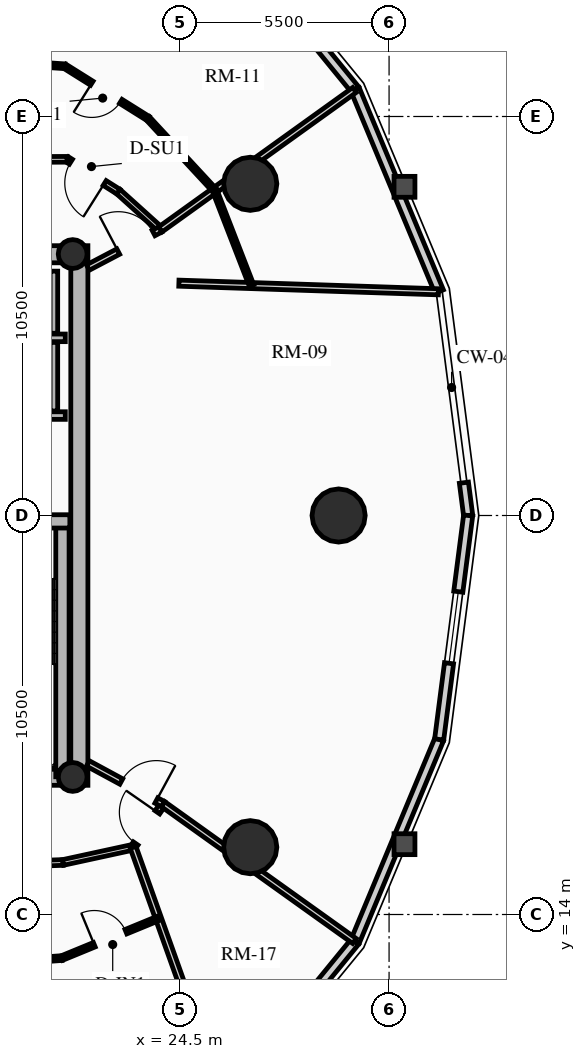
"""IFC4 building model, lengths in metres.
Left out: names, types, materials, properties, quantities, classifications, styles, units other than length and angle.
Written with IfcOpenShell. Run it as: python <this file> out.ifc"""

import sys

from ifc_helpers import new_model, si_unit, direction, frame, frame_2d, origin, origin_2d, place, context, subcontext, project, spatial, rectangle, circle, hollow_circle, extrude, source, transform, mapped, element, fill, save


model = new_model("IFC4")
c1 = context("Model", 3, precision=1e-05, world=origin(), true_north=direction((0.0, 1.0)))
c2 = subcontext(c1, "Body", "Model", "MODEL_VIEW")
j1 = project(units=[si_unit("LENGTHUNIT", "METRE"), si_unit("PLANEANGLEUNIT", "RADIAN")], contexts=[c1])
p1 = place(None, origin())
s1 = spatial("IfcSite", under=j1, at=p1, CompositionType="ELEMENT")
p2 = place(p1, origin())
s2 = spatial("IfcBuilding", under=s1, at=p2, CompositionType="ELEMENT")
p3 = place(p2, frame((0.0, 0.0, 105.07)))
s3 = spatial("IfcBuildingStorey", under=s2, at=p3, CompositionType="ELEMENT", Elevation=105.07)
p4 = place(p3, frame((21.85, 17.4, 0.0), z_axis=(0.0, 0.0, 1.0), x_axis=(0.0, 1.0, 0.0)))
e1 = element("IfcWall", 1, at=p4, inside=s3, PredefinedType="SHEAR", context=c2, shape_type="SweptSolid", body=[
    extrude(rectangle(XDim=14.2, YDim=0.45, at=frame_2d((7.1, 0.0))), origin(), (0.0, 0.0, 1.0), 2.91),
])
p5 = place(p3, frame((11.15, 17.625, 0.0), z_axis=(0.0, 0.0, 1.0), x_axis=(1.0, 0.0, 0.0)))
e2 = element("IfcWall", 2, at=p5, inside=s3, PredefinedType="SHEAR", context=c2, shape_type="SweptSolid", body=[
    extrude(rectangle(XDim=10.7, YDim=0.45, at=frame_2d((5.35, 0.0))), origin(), (0.0, 0.0, 1.0), 2.91),
])
m1 = source(origin(), c2, "Body", "SweptSolid", [
    extrude(rectangle(XDim=1.5, YDim=2.02, at=frame_2d((0.75, 1.01))), frame((0.0, 0.235, 0.0), z_axis=(0.0, -1.0, 0.0), x_axis=(1.0, 0.0, 0.0)), (0.0, 0.0, 1.0), 0.47),
])
p6 = place(p5, frame((5.45, 0.0, 0.0)))
e3 = element("IfcOpeningElement", 3, at=p6, cuts=e2, PredefinedType="OPENING", context=c2, shape_type="MappedRepresentation", body=[
    mapped(m1, transform((0.0, 0.0, 0.0), x_axis=(1.0, 0.0, 0.0), y_axis=(0.0, 1.0, 0.0), z_axis=(0.0, 0.0, 1.0), scale=1.0)),
])
p7 = place(p3, frame((11.15, 31.375, 0.0), z_axis=(0.0, 0.0, 1.0), x_axis=(1.0, 0.0, 0.0)))
e4 = element("IfcWall", 4, at=p7, inside=s3, PredefinedType="SHEAR", context=c2, shape_type="SweptSolid", body=[
    extrude(rectangle(XDim=10.7, YDim=0.45, at=frame_2d((5.35, 0.0))), origin(), (0.0, 0.0, 1.0), 2.91),
])
p8 = place(p7, frame((4.6, 0.0, 0.0)))
e5 = element("IfcOpeningElement", 5, at=p8, cuts=e4, PredefinedType="OPENING", context=c2, shape_type="MappedRepresentation", body=[
    mapped(m1, transform((0.0, 0.0, 0.0), x_axis=(1.0, 0.0, 0.0), y_axis=(0.0, 1.0, 0.0), z_axis=(0.0, 0.0, 1.0), scale=1.0)),
])
p9 = place(p3, frame((21.405, 17.625, 0.0), z_axis=(0.0, 0.0, 1.0), x_axis=(0.0, 1.0, 0.0)))
e6 = element("IfcWall", 6, at=p9, inside=s3, PredefinedType="SHEAR", context=c2, shape_type="SweptSolid", body=[
    extrude(rectangle(XDim=6.72, YDim=0.35, at=frame_2d((3.36, 0.0))), origin(), (0.0, 0.0, 1.0), 2.91),
])
p10 = place(p3, frame((18.315, 24.345, 0.0), z_axis=(0.0, 0.0, 1.0), x_axis=(1.0, 0.0, 0.0)))
e7 = element("IfcWall", 7, at=p10, inside=s3, PredefinedType="SHEAR", context=c2, shape_type="SweptSolid", body=[
    extrude(rectangle(XDim=3.285, YDim=0.35, at=frame_2d((1.643, 0.0))), origin(), (0.0, 0.0, 1.0), 2.91),
])
for number, where, z_axis, x_axis in (
    (8, (21.675, 17.62, 0.0), (0.0, 0.0, 1.0), (1.0, 0.0, 0.0)),
    (9, (21.675, 31.38, 0.0), (0.0, 0.0, 1.0), (1.0, 0.0, 0.0)),
):
    element("IfcColumn", number, at=place(p3, frame(where, z_axis=z_axis, x_axis=x_axis)), inside=s3, PredefinedType="COLUMN", context=c2, shape_type="SweptSolid", body=[
        extrude(hollow_circle(Radius=0.38, WallThickness=0.032, at=origin_2d()), origin(), (0.0, 0.0, 1.0), 2.91),
    ])
for number, where, z_axis, x_axis in (
    (10, (28.672, 24.5, 0.0), (0.0, 0.0, 1.0), (1.0, 0.0, 0.0)),
    (11, (26.347, 33.229, 0.0), (0.0, 0.0, 1.0), (1.0, 0.0, 0.0)),
    (12, (26.347, 15.771, 0.0), (0.0, 0.0, 1.0), (1.0, 0.0, 0.0)),
):
    element("IfcColumn", number, at=place(p3, frame(where, z_axis=z_axis, x_axis=x_axis)), inside=s3, PredefinedType="USERDEFINED", context=c2, shape_type="SweptSolid", body=[
        extrude(circle(Radius=0.7, at=origin_2d()), origin(), (0.0, 0.0, 1.0), 2.91),
    ])
p11 = place(p3, frame((31.969, 25.363, 0.0), z_axis=(0.0, 0.0, 1.0), x_axis=(0.128523364007, -0.991706481225, 0.0)))
e13 = element("IfcWall", 13, at=p11, inside=s3, PredefinedType="SOLIDWALL", context=c2, shape_type="SweptSolid", body=[
    extrude(rectangle(XDim=0.87, YDim=0.24, at=frame_2d((0.435, 0.0))), origin(), (0.0, 0.0, 1.0), 2.655),
])
p12 = place(p3, frame((29.105, 35.709, 0.0), z_axis=(0.0, 0.0, 1.0), x_axis=(0.384344417632, -0.923189779317, 0.0)))
e14 = element("IfcWall", 14, at=p12, inside=s3, PredefinedType="SOLIDWALL", context=c2, shape_type="SweptSolid", body=[
    extrude(rectangle(XDim=5.758, YDim=0.24, at=frame_2d((2.879, 0.0))), origin(), (0.0, 0.0, 1.0), 2.179),
])
p13 = place(p3, frame((25.658, 39.928, 0.0), z_axis=(0.0, 0.0, 1.0), x_axis=(0.632700781152, -0.77439635945, 0.0)))
e15 = element("IfcWall", 15, at=p13, inside=s3, PredefinedType="SOLIDWALL", context=c2, shape_type="SweptSolid", body=[
    extrude(rectangle(XDim=5.448, YDim=0.24, at=frame_2d((2.724, 0.0))), origin(), (0.0, 0.0, 1.0), 2.179),
])
m2 = source(origin(), c2, "Body", "SweptSolid", [
    extrude(rectangle(XDim=1.9, YDim=1.35, at=frame_2d((0.95, 0.675))), frame((0.0, 0.13, 0.0), z_axis=(0.0, -1.0, 0.0), x_axis=(1.0, 0.0, 0.0)), (0.0, 0.0, 1.0), 0.26),
])
p14 = place(p13, frame((1.774, 0.0, 0.65)))
e16 = element("IfcOpeningElement", 16, at=p14, cuts=e15, PredefinedType="OPENING", context=c2, shape_type="MappedRepresentation", body=[
    mapped(m2, transform((0.0, 0.0, 0.0), x_axis=(1.0, 0.0, 0.0), y_axis=(0.0, 1.0, 0.0), z_axis=(0.0, 0.0, 1.0), scale=1.0)),
])
p15 = place(p3, frame((29.105, 13.291, 0.0), z_axis=(0.0, 0.0, 1.0), x_axis=(-0.632700781152, -0.77439635945, 0.0)))
e17 = element("IfcWall", 17, at=p15, inside=s3, PredefinedType="SOLIDWALL", context=c2, shape_type="SweptSolid", body=[
    extrude(rectangle(XDim=5.448, YDim=0.24, at=frame_2d((2.724, 0.0))), origin(), (0.0, 0.0, 1.0), 2.179),
])
p16 = place(p15, frame((1.774, 0.0, 0.65)))
e18 = element("IfcOpeningElement", 18, at=p16, cuts=e17, PredefinedType="OPENING", context=c2, shape_type="MappedRepresentation", body=[
    mapped(m2, transform((0.0, 0.0, 0.0), x_axis=(1.0, 0.0, 0.0), y_axis=(0.0, 1.0, 0.0), z_axis=(0.0, 0.0, 1.0), scale=1.0)),
])
p17 = place(p3, frame((31.318, 18.607, 0.0), z_axis=(0.0, 0.0, 1.0), x_axis=(-0.384344417632, -0.923189779317, 0.0)))
e19 = element("IfcWall", 19, at=p17, inside=s3, PredefinedType="SOLIDWALL", context=c2, shape_type="SweptSolid", body=[
    extrude(rectangle(XDim=5.758, YDim=0.24, at=frame_2d((2.879, 0.0))), origin(), (0.0, 0.0, 1.0), 2.179),
])
p18 = place(p3, frame((32.081, 24.5, 0.0), z_axis=(0.0, 0.0, 1.0), x_axis=(-0.128351991996, -0.991728675672, 0.0)))
e20 = element("IfcWall", 20, at=p18, inside=s3, PredefinedType="SOLIDWALL", context=c2, shape_type="SweptSolid", body=[
    extrude(rectangle(XDim=5.942, YDim=0.24, at=frame_2d((2.971, 0.0))), origin(), (0.0, 0.0, 1.0), 2.179),
])
p19 = place(p18, frame((2.021, 0.0, 0.65)))
e21 = element("IfcOpeningElement", 21, at=p19, cuts=e20, PredefinedType="OPENING", context=c2, shape_type="MappedRepresentation", body=[
    mapped(m2, transform((0.0, 0.0, 0.0), x_axis=(1.0, 0.0, 0.0), y_axis=(0.0, 1.0, 0.0), z_axis=(0.0, 0.0, 1.0), scale=1.0)),
])
for number, where, z_axis, x_axis in (
    (22, (18.51, 27.13, 0.0), (0.0, 0.0, 1.0), (1.0, 0.0, 0.0)),
    (23, (18.51, 29.175, 0.0), (0.0, 0.0, 1.0), (1.0, 0.0, 0.0)),
):
    element("IfcWall", number, at=place(p3, frame(where, z_axis=z_axis, x_axis=x_axis)), inside=s3, PredefinedType="SHEAR", context=c2, shape_type="SweptSolid", body=[
        extrude(rectangle(XDim=2.97, YDim=0.2, at=frame_2d((1.485, 0.0))), origin(), (0.0, 0.0, 1.0), 2.91),
    ])
p20 = place(p3, frame((21.18, 27.25, 0.0), z_axis=(0.0, 0.0, 1.0), x_axis=(0.0, 1.0, 0.0)))
e24 = element("IfcWall", 24, at=p20, inside=s3, PredefinedType="SHEAR", context=c2, shape_type="SweptSolid", body=[
    extrude(rectangle(XDim=1.805, YDim=0.2, at=frame_2d((0.902, 0.0))), origin(), (0.0, 0.0, 1.0), 2.91),
])
p21 = place(p3, frame((21.18, 29.295, 0.0), z_axis=(0.0, 0.0, 1.0), x_axis=(0.0, 1.0, 0.0)))
e25 = element("IfcWall", 25, at=p21, inside=s3, PredefinedType="SHEAR", context=c2, shape_type="SweptSolid", body=[
    extrude(rectangle(XDim=1.635, YDim=0.2, at=frame_2d((0.817, 0.0))), origin(), (0.0, 0.0, 1.0), 2.91),
])
p22 = place(p3, frame((23.98, 32.027, 0.0), z_axis=(0.0, 0.0, 1.0), x_axis=(-0.742353224332, 0.670008724065, 0.0)))
e26 = element("IfcWall", 26, at=p22, inside=s3, PredefinedType="PARTITIONING", context=c2, shape_type="SweptSolid", body=[
    extrude(rectangle(XDim=1.485, YDim=0.15, at=frame_2d((0.742, 0.0))), origin(), (0.0, 0.0, 1.0), 2.225),
])
p23 = place(p3, frame((22.877, 33.022, 0.0), z_axis=(0.0, 0.0, 1.0), x_axis=(-0.845895608855, 0.533348496689, 0.0)))
e27 = element("IfcWall", 27, at=p23, inside=s3, PredefinedType="PARTITIONING", context=c2, shape_type="SweptSolid", body=[
    extrude(rectangle(XDim=1.597, YDim=0.15, at=frame_2d((0.798, 0.0))), origin(), (0.0, 0.0, 1.0), 2.225),
])
m3 = source(origin(), c2, "Body", "SweptSolid", [
    extrude(rectangle(XDim=1.05, YDim=2.015, at=frame_2d((0.525, 1.007))), frame((0.0, 0.085, 0.0), z_axis=(0.0, -1.0, 0.0), x_axis=(1.0, 0.0, 0.0)), (0.0, 0.0, 1.0), 0.17),
])
p24 = place(p23, frame((0.427, 0.0, 0.0)))
e28 = element("IfcOpeningElement", 28, at=p24, cuts=e27, PredefinedType="OPENING", context=c2, shape_type="MappedRepresentation", body=[
    mapped(m3, transform((0.0, 0.0, 0.0), x_axis=(1.0, 0.0, 0.0), y_axis=(0.0, 1.0, 0.0), z_axis=(0.0, 0.0, 1.0), scale=1.0)),
])
p25 = place(p3, frame((21.527, 33.873, 0.0), z_axis=(0.0, 0.0, 1.0), x_axis=(-0.999991838845, -0.004040079574, 0.0)))
e29 = element("IfcWall", 29, at=p25, inside=s3, PredefinedType="PARTITIONING", context=c2, shape_type="SweptSolid", body=[
    extrude(rectangle(XDim=3.384, YDim=0.15, at=frame_2d((1.692, 0.0))), origin(), (0.0, 0.0, 1.0), 2.225),
])
p26 = place(p3, frame((14.781, 15.141, 0.0), z_axis=(0.0, 0.0, 1.0), x_axis=(0.999407918707, 0.034406569513, 0.0)))
e30 = element("IfcWall", 30, at=p26, inside=s3, PredefinedType="PARTITIONING", context=c2, shape_type="SweptSolid", body=[
    extrude(rectangle(XDim=6.642, YDim=0.15, at=frame_2d((3.321, 0.0))), origin(), (0.0, 0.0, 1.0), 2.225),
])
p27 = place(p26, frame((2.796, 0.0, 0.0)))
e31 = element("IfcOpeningElement", 31, at=p27, cuts=e30, PredefinedType="OPENING", context=c2, shape_type="MappedRepresentation", body=[
    mapped(m3, transform((0.0, 0.0, 0.0), x_axis=(1.0, 0.0, 0.0), y_axis=(0.0, 1.0, 0.0), z_axis=(0.0, 0.0, 1.0), scale=1.0)),
])
p28 = place(p3, frame((21.419, 15.369, 0.0), z_axis=(0.0, 0.0, 1.0), x_axis=(0.977192701953, 0.212354475464, 0.0)))
e32 = element("IfcWall", 32, at=p28, inside=s3, PredefinedType="PARTITIONING", context=c2, shape_type="SweptSolid", body=[
    extrude(rectangle(XDim=1.888, YDim=0.15, at=frame_2d((0.944, 0.0))), origin(), (0.0, 0.0, 1.0), 2.225),
])
p29 = place(p3, frame((23.263, 15.77, 0.0), z_axis=(0.0, 0.0, 1.0), x_axis=(0.570743456919, 0.821128434768, 0.0)))
e33 = element("IfcWall", 33, at=p29, inside=s3, PredefinedType="PARTITIONING", context=c2, shape_type="SweptSolid", body=[
    extrude(rectangle(XDim=1.382, YDim=0.15, at=frame_2d((0.691, 0.0))), origin(), (0.0, 0.0, 1.0), 2.225),
])
m4 = source(origin(), c2, "Body", "SweptSolid", [
    extrude(rectangle(XDim=1.0, YDim=2.015, at=frame_2d((0.5, 1.007))), frame((0.0, 0.085, 0.0), z_axis=(0.0, -1.0, 0.0), x_axis=(1.0, 0.0, 0.0)), (0.0, 0.0, 1.0), 0.17),
])
p30 = place(p29, frame((0.12, 0.0, 0.0)))
e34 = element("IfcOpeningElement", 34, at=p30, cuts=e33, PredefinedType="OPENING", context=c2, shape_type="MappedRepresentation", body=[
    mapped(m4, transform((0.0, 0.0, 0.0), x_axis=(1.0, 0.0, 0.0), y_axis=(0.0, 1.0, 0.0), z_axis=(0.0, 0.0, 1.0), scale=1.0)),
])
p31 = place(p3, frame((24.469, 30.614, 0.0), z_axis=(0.0, 0.0, 1.0), x_axis=(0.999446768925, -0.033258924898, 0.0)))
e35 = element("IfcWall", 35, at=p31, inside=s3, PredefinedType="PARTITIONING", context=c2, shape_type="SweptSolid", body=[
    extrude(rectangle(XDim=6.834, YDim=0.16, at=frame_2d((3.417, 0.0))), origin(), (0.0, 0.0, 1.0), 2.179),
])
p32 = place(p3, frame((23.98, 32.027, 0.0), z_axis=(0.0, 0.0, 1.0), x_axis=(0.812162479031, 0.58343132214, 0.0)))
e36 = element("IfcWall", 36, at=p32, inside=s3, PredefinedType="PARTITIONING", context=c2, shape_type="SweptSolid", body=[
    extrude(rectangle(XDim=6.291, YDim=0.16, at=frame_2d((3.146, 0.0))), origin(), (0.0, 0.0, 1.0), 2.179),
])
p33 = place(p3, frame((23.263, 15.77, 0.0), z_axis=(0.0, 0.0, 1.0), x_axis=(0.335919964206, -0.941890533793, 0.0)))
e37 = element("IfcWall", 37, at=p33, inside=s3, PredefinedType="PARTITIONING", context=c2, shape_type="SweptSolid", body=[
    extrude(rectangle(XDim=7.094, YDim=0.16, at=frame_2d((3.547, 0.0))), origin(), (0.0, 0.0, 1.0), 2.179),
])
p34 = place(p3, frame((24.052, 16.905, 0.0), z_axis=(0.0, 0.0, 1.0), x_axis=(0.813437670746, -0.581652091727, 0.0)))
e38 = element("IfcWall", 38, at=p34, inside=s3, PredefinedType="PARTITIONING", context=c2, shape_type="SweptSolid", body=[
    extrude(rectangle(XDim=6.192, YDim=0.16, at=frame_2d((3.096, 0.0))), origin(), (0.0, 0.0, 1.0), 2.179),
])
p35 = place(p3, frame((22.075, 31.025, 0.0), z_axis=(0.0, 0.0, 1.0), x_axis=(0.885026466958, 0.465540710125, 0.0)))
e39 = element("IfcWall", 39, at=p35, inside=s3, PredefinedType="PARTITIONING", context=c2, shape_type="SweptSolid", body=[
    extrude(rectangle(XDim=2.152, YDim=0.16, at=frame_2d((1.076, 0.0))), origin(), (0.0, 0.0, 1.0), 2.225),
])
m5 = source(origin(), c2, "Body", "SweptSolid", [
    extrude(rectangle(XDim=1.05, YDim=2.015, at=frame_2d((0.525, 1.007))), frame((0.0, 0.09, 0.0), z_axis=(0.0, -1.0, 0.0), x_axis=(1.0, 0.0, 0.0)), (0.0, 0.0, 1.0), 0.18),
])
p36 = place(p35, frame((0.902, 0.0, 0.0)))
e40 = element("IfcOpeningElement", 40, at=p36, cuts=e39, PredefinedType="OPENING", context=c2, shape_type="MappedRepresentation", body=[
    mapped(m5, transform((0.0, 0.0, 0.0), x_axis=(1.0, 0.0, 0.0), y_axis=(0.0, 1.0, 0.0), z_axis=(0.0, 0.0, 1.0), scale=1.0)),
])
p37 = place(p3, frame((22.075, 17.975, 0.0), z_axis=(0.0, 0.0, 1.0), x_axis=(0.879356383302, -0.476164206073, 0.0)))
e41 = element("IfcWall", 41, at=p37, inside=s3, PredefinedType="PARTITIONING", context=c2, shape_type="SweptSolid", body=[
    extrude(rectangle(XDim=2.248, YDim=0.16, at=frame_2d((1.124, 0.0))), origin(), (0.0, 0.0, 1.0), 2.225),
])
p38 = place(p37, frame((0.998, 0.0, 0.0)))
e42 = element("IfcOpeningElement", 42, at=p38, cuts=e41, PredefinedType="OPENING", context=c2, shape_type="MappedRepresentation", body=[
    mapped(m5, transform((0.0, 0.0, 0.0), x_axis=(1.0, 0.0, 0.0), y_axis=(0.0, 1.0, 0.0), z_axis=(0.0, 0.0, 1.0), scale=1.0)),
])
p39 = place(p3, frame((26.382, 30.551, 0.0), z_axis=(0.0, 0.0, 1.0), x_axis=(-0.361621391028, 0.932325034283, 0.0)))
e43 = element("IfcWall", 43, at=p39, inside=s3, PredefinedType="PARTITIONING", context=c2, shape_type="SweptSolid", body=[
    extrude(rectangle(XDim=2.686, YDim=0.125, at=frame_2d((1.343, 0.0))), origin(), (0.0, 0.0, 1.0), 2.225),
])
p40 = place(p3, frame((25.41, 33.054, 0.0), z_axis=(0.0, 0.0, 1.0), x_axis=(-0.679733694606, 0.73345899982, 0.0)))
e44 = element("IfcWall", 44, at=p40, inside=s3, PredefinedType="PARTITIONING", context=c2, shape_type="SweptSolid", body=[
    extrude(rectangle(XDim=2.586, YDim=0.125, at=frame_2d((1.293, 0.0))), origin(), (0.0, 0.0, 1.0), 2.655),
])
p41 = place(p3, frame((23.653, 34.951, 0.0), z_axis=(0.0, 0.0, 1.0), x_axis=(-0.847306782665, 0.531103771452, 0.0)))
e45 = element("IfcWall", 45, at=p41, inside=s3, PredefinedType="PARTITIONING", context=c2, shape_type="SweptSolid", body=[
    extrude(rectangle(XDim=2.581, YDim=0.125, at=frame_2d((1.291, 0.0))), origin(), (0.0, 0.0, 1.0), 2.225),
])
m6 = source(origin(), c2, "Body", "SweptSolid", [
    extrude(rectangle(XDim=0.9, YDim=2.005, at=frame_2d((0.45, 1.002))), frame((0.0, 0.073, 0.0), z_axis=(0.0, -1.0, 0.0), x_axis=(1.0, 0.0, 0.0)), (0.0, 0.0, 1.0), 0.145),
])
p42 = place(p41, frame((0.841, 0.0, 0.0)))
e46 = element("IfcOpeningElement", 46, at=p42, cuts=e45, PredefinedType="OPENING", context=c2, shape_type="MappedRepresentation", body=[
    mapped(m6, transform((0.0, 0.0, 0.0), x_axis=(1.0, 0.0, 0.0), y_axis=(0.0, 1.0, 0.0), z_axis=(0.0, 0.0, 1.0), scale=1.0)),
])
p43 = place(p3, frame((21.466, 36.322, 0.0), z_axis=(0.0, 0.0, 1.0), x_axis=(-0.997806476515, 0.066198454847, 0.0)))
e47 = element("IfcWall", 47, at=p43, inside=s3, PredefinedType="PARTITIONING", context=c2, shape_type="SweptSolid", body=[
    extrude(rectangle(XDim=3.791, YDim=0.125, at=frame_2d((1.896, 0.0))), origin(), (0.0, 0.0, 1.0), 2.225),
])
p44 = place(p3, frame((15.262, 12.427, 0.0), z_axis=(0.0, 0.0, 1.0), x_axis=(0.997595855995, 0.069300130605, 0.0)))
e48 = element("IfcWall", 48, at=p44, inside=s3, PredefinedType="PARTITIONING", context=c2, shape_type="SweptSolid", body=[
    extrude(rectangle(XDim=6.14, YDim=0.125, at=frame_2d((3.07, 0.0))), origin(), (0.0, 0.0, 1.0), 2.225),
])
p45 = place(p3, frame((21.388, 12.853, 0.0), z_axis=(0.0, 0.0, 1.0), x_axis=(0.924757149715, 0.380557767036, 0.0)))
e49 = element("IfcWall", 49, at=p45, inside=s3, PredefinedType="PARTITIONING", context=c2, shape_type="SweptSolid", body=[
    extrude(rectangle(XDim=2.75, YDim=0.125, at=frame_2d((1.375, 0.0))), origin(), (0.0, 0.0, 1.0), 2.179),
])
p46 = place(p45, frame((0.925, 0.0, 0.0)))
e50 = element("IfcOpeningElement", 50, at=p46, cuts=e49, PredefinedType="OPENING", context=c2, shape_type="MappedRepresentation", body=[
    mapped(m6, transform((0.0, 0.0, 0.0), x_axis=(1.0, 0.0, 0.0), y_axis=(0.0, 1.0, 0.0), z_axis=(0.0, 0.0, 1.0), scale=1.0)),
])
m7 = source(origin(), c2, "Body", "SweptSolid", [
    extrude(rectangle(XDim=1.9, YDim=1.35, at=frame_2d((0.95, 0.675))), frame((0.0, 0.03, 0.0), z_axis=(0.0, -1.0, 0.0), x_axis=(1.0, 0.0, 0.0)), (0.0, 0.0, 1.0), 0.06),
])
p47 = place(p19, origin())
e51 = element("IfcWindow", 51, at=p47, inside=s3, PartitioningType="DOUBLE_PANEL_VERTICAL", PredefinedType="WINDOW", context=c2, shape_type="MappedRepresentation", body=[
    mapped(m7, transform((0.0, 0.0, 0.0), x_axis=(1.0, 0.0, 0.0), y_axis=(0.0, 1.0, 0.0), z_axis=(0.0, 0.0, 1.0), scale=1.0)),
])
fill(e21, e51)
m8 = source(origin(), c2, "Body", "SweptSolid", [
    extrude(rectangle(XDim=1.05, YDim=2.015, at=frame_2d((0.525, 1.007))), frame((0.0, 0.025, 0.0), z_axis=(0.0, -1.0, 0.0), x_axis=(1.0, 0.0, 0.0)), (0.0, 0.0, 1.0), 0.05),
])
p48 = place(p36, origin())
e52 = element("IfcDoor", 52, at=p48, inside=s3, OperationType="SINGLE_SWING_LEFT", PredefinedType="DOOR", context=c2, shape_type="MappedRepresentation", body=[
    mapped(m8, transform((0.0, 0.0, 0.0), x_axis=(1.0, 0.0, 0.0), y_axis=(0.0, 1.0, 0.0), z_axis=(0.0, 0.0, 1.0), scale=1.0)),
])
fill(e40, e52)
p49 = place(p38, origin())
e53 = element("IfcDoor", 53, at=p49, inside=s3, OperationType="SINGLE_SWING_RIGHT", PredefinedType="DOOR", context=c2, shape_type="MappedRepresentation", body=[
    mapped(m8, transform((0.0, 0.0, 0.0), x_axis=(1.0, 0.0, 0.0), y_axis=(0.0, 1.0, 0.0), z_axis=(0.0, 0.0, 1.0), scale=1.0)),
])
fill(e42, e53)
p50 = place(p24, origin())
e54 = element("IfcDoor", 54, at=p50, inside=s3, OperationType="SINGLE_SWING_LEFT", PredefinedType="DOOR", context=c2, shape_type="MappedRepresentation", body=[
    mapped(m8, transform((0.0, 0.0, 0.0), x_axis=(1.0, 0.0, 0.0), y_axis=(0.0, 1.0, 0.0), z_axis=(0.0, 0.0, 1.0), scale=1.0)),
])
fill(e28, e54)
m9 = source(origin(), c2, "Body", "SweptSolid", [
    extrude(rectangle(XDim=0.9, YDim=2.005, at=frame_2d((0.45, 1.002))), frame((0.0, 0.025, 0.0), z_axis=(0.0, -1.0, 0.0), x_axis=(1.0, 0.0, 0.0)), (0.0, 0.0, 1.0), 0.05),
])
p51 = place(p42, origin())
e55 = element("IfcDoor", 55, at=p51, inside=s3, OperationType="SINGLE_SWING_RIGHT", PredefinedType="DOOR", context=c2, shape_type="MappedRepresentation", body=[
    mapped(m9, transform((0.0, 0.0, 0.0), x_axis=(1.0, 0.0, 0.0), y_axis=(0.0, 1.0, 0.0), z_axis=(0.0, 0.0, 1.0), scale=1.0)),
])
fill(e46, e55)
p52 = place(p46, origin())
e56 = element("IfcDoor", 56, at=p52, inside=s3, OperationType="SINGLE_SWING_LEFT", PredefinedType="DOOR", context=c2, shape_type="MappedRepresentation", body=[
    mapped(m9, transform((0.0, 0.0, 0.0), x_axis=(1.0, 0.0, 0.0), y_axis=(0.0, 1.0, 0.0), z_axis=(0.0, 0.0, 1.0), scale=1.0)),
])
fill(e50, e56)
m10 = source(origin(), c2, "Body", "SweptSolid", [
    extrude(rectangle(XDim=1.0, YDim=2.015, at=frame_2d((0.5, 1.007))), frame((0.0, 0.025, 0.0), z_axis=(0.0, -1.0, 0.0), x_axis=(1.0, 0.0, 0.0)), (0.0, 0.0, 1.0), 0.05),
])
p53 = place(p30, origin())
e57 = element("IfcDoor", 57, at=p53, inside=s3, OperationType="SINGLE_SWING_RIGHT", PredefinedType="DOOR", context=c2, shape_type="MappedRepresentation", body=[
    mapped(m10, transform((0.0, 0.0, 0.0), x_axis=(1.0, 0.0, 0.0), y_axis=(0.0, 1.0, 0.0), z_axis=(0.0, 0.0, 1.0), scale=1.0)),
])
fill(e34, e57)
save(model, sys.argv[1])
